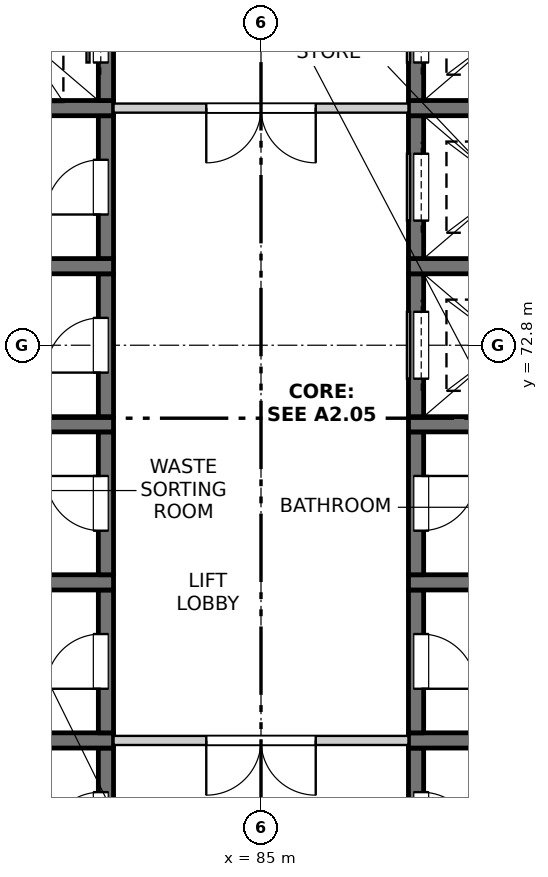
"""IFC4 building model, lengths in metres.
Left out: names, types, materials, properties, quantities, classifications, styles, units other than length and angle.
Written with IfcOpenShell. Run it as: python <this file> out.ifc"""

import sys

from ifc_helpers import new_model, si_unit, direction, frame, frame_2d, origin, place, context, subcontext, project, spatial, rectangle, extrude, element, fill, save


model = new_model("IFC4")
c1 = context("Model", 3, precision=1e-05, world=origin(), true_north=direction((0.0, 1.0)))
c2 = subcontext(c1, "Body", "Model", "MODEL_VIEW")
j1 = project(units=[si_unit("LENGTHUNIT", "METRE"), si_unit("PLANEANGLEUNIT", "RADIAN")], contexts=[c1])
p1 = place(None, origin())
s1 = spatial("IfcSite", under=j1, at=p1, CompositionType="ELEMENT")
p2 = place(p1, origin())
s2 = spatial("IfcBuilding", under=s1, at=p2, CompositionType="ELEMENT")
p3 = place(p2, frame((0.0, 0.0, 224.5)))
s3 = spatial("IfcBuildingStorey", under=s2, at=p3, CompositionType="ELEMENT", Elevation=224.5)
p4 = place(p3, frame((82.45, 63.825, -0.25), z_axis=(0.0, 0.0, 1.0), x_axis=(0.0, 1.0, 0.0)))
e1 = element("IfcWall", 1, at=p4, inside=s3, PredefinedType="SOLIDWALL", context=c2, shape_type="SweptSolid", body=[
    extrude(rectangle(XDim=2.35, YDim=0.25, at=frame_2d((1.175, 0.0))), origin(), (0.0, 0.0, 1.0), 3.4),
])
p5 = place(p4, frame((0.725, 0.0, 0.25)))
e2 = element("IfcOpeningElement", 2, at=p5, cuts=e1, PredefinedType="OPENING", context=c2, shape_type="SweptSolid", body=[
    extrude(rectangle(XDim=0.9, YDim=2.1, at=frame_2d((0.45, 1.05))), frame((0.0, 0.135, 0.0), z_axis=(0.0, -1.0, 0.0), x_axis=(1.0, 0.0, 0.0)), (0.0, 0.0, 1.0), 0.27),
])
p6 = place(p3, frame((79.575, 66.3, -0.25), z_axis=(0.0, 0.0, 1.0), x_axis=(1.0, 0.0, 0.0)))
e3 = element("IfcWall", 3, at=p6, inside=s3, PredefinedType="SOLIDWALL", context=c2, shape_type="SweptSolid", body=[
    extrude(rectangle(XDim=3.0, YDim=0.25, at=frame_2d((1.5, 0.0))), origin(), (0.0, 0.0, 1.0), 3.4),
])
p7 = place(p3, frame((82.45, 66.425, -0.25), z_axis=(0.0, 0.0, 1.0), x_axis=(0.0, 1.0, 0.0)))
e4 = element("IfcWall", 4, at=p7, inside=s3, PredefinedType="SOLIDWALL", context=c2, shape_type="SweptSolid", body=[
    extrude(rectangle(XDim=2.35, YDim=0.25, at=frame_2d((1.175, 0.0))), origin(), (0.0, 0.0, 1.0), 3.4),
])
p8 = place(p7, frame((0.725, 0.0, 0.25)))
e5 = element("IfcOpeningElement", 5, at=p8, cuts=e4, PredefinedType="OPENING", context=c2, shape_type="SweptSolid", body=[
    extrude(rectangle(XDim=0.9, YDim=2.1, at=frame_2d((0.45, 1.05))), frame((0.0, 0.135, 0.0), z_axis=(0.0, -1.0, 0.0), x_axis=(1.0, 0.0, 0.0)), (0.0, 0.0, 1.0), 0.27),
])
p9 = place(p3, frame((79.575, 68.9, -0.25), z_axis=(0.0, 0.0, 1.0), x_axis=(1.0, 0.0, 0.0)))
e6 = element("IfcWall", 6, at=p9, inside=s3, PredefinedType="SOLIDWALL", context=c2, shape_type="SweptSolid", body=[
    extrude(rectangle(XDim=3.0, YDim=0.25, at=frame_2d((1.5, 0.0))), origin(), (0.0, 0.0, 1.0), 3.4),
])
p10 = place(p3, frame((82.45, 69.025, -0.25), z_axis=(0.0, 0.0, 1.0), x_axis=(0.0, 1.0, 0.0)))
e7 = element("IfcWall", 7, at=p10, inside=s3, PredefinedType="SOLIDWALL", context=c2, shape_type="SweptSolid", body=[
    extrude(rectangle(XDim=2.35, YDim=0.25, at=frame_2d((1.175, 0.0))), origin(), (0.0, 0.0, 1.0), 3.4),
])
p11 = place(p10, frame((0.725, 0.0, 0.25)))
e8 = element("IfcOpeningElement", 8, at=p11, cuts=e7, PredefinedType="OPENING", context=c2, shape_type="SweptSolid", body=[
    extrude(rectangle(XDim=0.9, YDim=2.1, at=frame_2d((0.45, 1.05))), frame((0.0, 0.135, 0.0), z_axis=(0.0, -1.0, 0.0), x_axis=(1.0, 0.0, 0.0)), (0.0, 0.0, 1.0), 0.27),
])
p12 = place(p3, frame((79.575, 71.5, -0.25), z_axis=(0.0, 0.0, 1.0), x_axis=(1.0, 0.0, 0.0)))
e9 = element("IfcWall", 9, at=p12, inside=s3, PredefinedType="SOLIDWALL", context=c2, shape_type="SweptSolid", body=[
    extrude(rectangle(XDim=3.0, YDim=0.25, at=frame_2d((1.5, 0.0))), origin(), (0.0, 0.0, 1.0), 3.4),
])
p13 = place(p3, frame((82.45, 71.625, -0.25), z_axis=(0.0, 0.0, 1.0), x_axis=(0.0, 1.0, 0.0)))
e10 = element("IfcWall", 10, at=p13, inside=s3, PredefinedType="SOLIDWALL", context=c2, shape_type="SweptSolid", body=[
    extrude(rectangle(XDim=2.35, YDim=0.25, at=frame_2d((1.175, 0.0))), origin(), (0.0, 0.0, 1.0), 3.4),
])
p14 = place(p13, frame((0.725, 0.0, 0.25)))
e11 = element("IfcOpeningElement", 11, at=p14, cuts=e10, PredefinedType="OPENING", context=c2, shape_type="SweptSolid", body=[
    extrude(rectangle(XDim=0.9, YDim=2.1, at=frame_2d((0.45, 1.05))), frame((0.0, 0.135, 0.0), z_axis=(0.0, -1.0, 0.0), x_axis=(1.0, 0.0, 0.0)), (0.0, 0.0, 1.0), 0.27),
])
p15 = place(p3, frame((79.575, 74.1, -0.25), z_axis=(0.0, 0.0, 1.0), x_axis=(1.0, 0.0, 0.0)))
e12 = element("IfcWall", 12, at=p15, inside=s3, PredefinedType="SOLIDWALL", context=c2, shape_type="SweptSolid", body=[
    extrude(rectangle(XDim=3.0, YDim=0.25, at=frame_2d((1.5, 0.0))), origin(), (0.0, 0.0, 1.0), 3.4),
])
p16 = place(p3, frame((82.45, 74.225, -0.25), z_axis=(0.0, 0.0, 1.0), x_axis=(0.0, 1.0, 0.0)))
e13 = element("IfcWall", 13, at=p16, inside=s3, PredefinedType="SOLIDWALL", context=c2, shape_type="SweptSolid", body=[
    extrude(rectangle(XDim=2.35, YDim=0.25, at=frame_2d((1.175, 0.0))), origin(), (0.0, 0.0, 1.0), 3.4),
])
p17 = place(p16, frame((0.725, 0.0, 0.25)))
e14 = element("IfcOpeningElement", 14, at=p17, cuts=e13, PredefinedType="OPENING", context=c2, shape_type="SweptSolid", body=[
    extrude(rectangle(XDim=0.9, YDim=2.1, at=frame_2d((0.45, 1.05))), frame((0.0, 0.135, 0.0), z_axis=(0.0, -1.0, 0.0), x_axis=(1.0, 0.0, 0.0)), (0.0, 0.0, 1.0), 0.27),
])
p18 = place(p3, frame((79.575, 76.7, -0.25), z_axis=(0.0, 0.0, 1.0), x_axis=(1.0, 0.0, 0.0)))
e15 = element("IfcWall", 15, at=p18, inside=s3, PredefinedType="SOLIDWALL", context=c2, shape_type="SweptSolid", body=[
    extrude(rectangle(XDim=3.0, YDim=0.25, at=frame_2d((1.5, 0.0))), origin(), (0.0, 0.0, 1.0), 3.4),
])
p19 = place(p3, frame((82.45, 76.825, -0.25), z_axis=(0.0, 0.0, 1.0), x_axis=(0.0, 1.0, 0.0)))
e16 = element("IfcWall", 16, at=p19, inside=s3, PredefinedType="SOLIDWALL", context=c2, shape_type="SweptSolid", body=[
    extrude(rectangle(XDim=2.35, YDim=0.25, at=frame_2d((1.175, 0.0))), origin(), (0.0, 0.0, 1.0), 3.4),
])
p20 = place(p19, frame((0.625, 0.0, 0.25)))
e17 = element("IfcOpeningElement", 17, at=p20, cuts=e16, PredefinedType="OPENING", context=c2, shape_type="SweptSolid", body=[
    extrude(rectangle(XDim=1.1, YDim=2.1, at=frame_2d((0.55, 1.05))), frame((0.0, 0.135, 0.0), z_axis=(0.0, -1.0, 0.0), x_axis=(1.0, 0.0, 0.0)), (0.0, 0.0, 1.0), 0.27),
])
p21 = place(p3, frame((87.55, 63.825, -0.25), z_axis=(0.0, 0.0, 1.0), x_axis=(0.0, 1.0, 0.0)))
e18 = element("IfcWall", 18, at=p21, inside=s3, PredefinedType="SOLIDWALL", context=c2, shape_type="SweptSolid", body=[
    extrude(rectangle(XDim=2.35, YDim=0.25, at=frame_2d((1.175, 0.0))), origin(), (0.0, 0.0, 1.0), 3.4),
])
p22 = place(p21, frame((0.725, 0.0, 0.25)))
e19 = element("IfcOpeningElement", 19, at=p22, cuts=e18, PredefinedType="OPENING", context=c2, shape_type="SweptSolid", body=[
    extrude(rectangle(XDim=0.9, YDim=2.1, at=frame_2d((0.45, 1.05))), frame((0.0, 0.135, 0.0), z_axis=(0.0, -1.0, 0.0), x_axis=(1.0, 0.0, 0.0)), (0.0, 0.0, 1.0), 0.27),
])
p23 = place(p3, frame((87.425, 66.3, -0.25), z_axis=(0.0, 0.0, 1.0), x_axis=(1.0, 0.0, 0.0)))
e20 = element("IfcWall", 20, at=p23, inside=s3, PredefinedType="SOLIDWALL", context=c2, shape_type="SweptSolid", body=[
    extrude(rectangle(XDim=3.0, YDim=0.25, at=frame_2d((1.5, 0.0))), origin(), (0.0, 0.0, 1.0), 3.4),
])
p24 = place(p3, frame((87.55, 66.425, -0.25), z_axis=(0.0, 0.0, 1.0), x_axis=(0.0, 1.0, 0.0)))
e21 = element("IfcWall", 21, at=p24, inside=s3, PredefinedType="SOLIDWALL", context=c2, shape_type="SweptSolid", body=[
    extrude(rectangle(XDim=2.35, YDim=0.25, at=frame_2d((1.175, 0.0))), origin(), (0.0, 0.0, 1.0), 3.4),
])
p25 = place(p24, frame((0.725, 0.0, 0.25)))
e22 = element("IfcOpeningElement", 22, at=p25, cuts=e21, PredefinedType="OPENING", context=c2, shape_type="SweptSolid", body=[
    extrude(rectangle(XDim=0.9, YDim=2.1, at=frame_2d((0.45, 1.05))), frame((0.0, 0.135, 0.0), z_axis=(0.0, -1.0, 0.0), x_axis=(1.0, 0.0, 0.0)), (0.0, 0.0, 1.0), 0.27),
])
p26 = place(p3, frame((87.425, 68.9, -0.25), z_axis=(0.0, 0.0, 1.0), x_axis=(1.0, 0.0, 0.0)))
e23 = element("IfcWall", 23, at=p26, inside=s3, PredefinedType="SOLIDWALL", context=c2, shape_type="SweptSolid", body=[
    extrude(rectangle(XDim=3.0, YDim=0.25, at=frame_2d((1.5, 0.0))), origin(), (0.0, 0.0, 1.0), 3.4),
])
p27 = place(p3, frame((87.55, 69.025, -0.25), z_axis=(0.0, 0.0, 1.0), x_axis=(0.0, 1.0, 0.0)))
e24 = element("IfcWall", 24, at=p27, inside=s3, PredefinedType="SOLIDWALL", context=c2, shape_type="SweptSolid", body=[
    extrude(rectangle(XDim=2.35, YDim=0.25, at=frame_2d((1.175, 0.0))), origin(), (0.0, 0.0, 1.0), 3.4),
])
p28 = place(p27, frame((0.725, 0.0, 0.25)))
e25 = element("IfcOpeningElement", 25, at=p28, cuts=e24, PredefinedType="OPENING", context=c2, shape_type="SweptSolid", body=[
    extrude(rectangle(XDim=0.9, YDim=2.1, at=frame_2d((0.45, 1.05))), frame((0.0, 0.135, 0.0), z_axis=(0.0, -1.0, 0.0), x_axis=(1.0, 0.0, 0.0)), (0.0, 0.0, 1.0), 0.27),
])
p29 = place(p3, frame((87.425, 71.5, -0.25), z_axis=(0.0, 0.0, 1.0), x_axis=(1.0, 0.0, 0.0)))
e26 = element("IfcWall", 26, at=p29, inside=s3, PredefinedType="SOLIDWALL", context=c2, shape_type="SweptSolid", body=[
    extrude(rectangle(XDim=3.0, YDim=0.25, at=frame_2d((1.5, 0.0))), origin(), (0.0, 0.0, 1.0), 3.4),
])
p30 = place(p3, frame((87.55, 71.625, -0.25), z_axis=(0.0, 0.0, 1.0), x_axis=(0.0, 1.0, 0.0)))
e27 = element("IfcWall", 27, at=p30, inside=s3, PredefinedType="SOLIDWALL", context=c2, shape_type="SweptSolid", body=[
    extrude(rectangle(XDim=2.35, YDim=0.25, at=frame_2d((1.175, 0.0))), origin(), (0.0, 0.0, 1.0), 3.4),
])
p31 = place(p30, frame((0.625, 0.0, 0.25)))
e28 = element("IfcOpeningElement", 28, at=p31, cuts=e27, PredefinedType="OPENING", context=c2, shape_type="SweptSolid", body=[
    extrude(rectangle(XDim=1.1, YDim=2.1, at=frame_2d((0.55, 1.05))), frame((0.0, 0.135, 0.0), z_axis=(0.0, -1.0, 0.0), x_axis=(1.0, 0.0, 0.0)), (0.0, 0.0, 1.0), 0.27),
])
p32 = place(p3, frame((87.425, 74.1, -0.25), z_axis=(0.0, 0.0, 1.0), x_axis=(1.0, 0.0, 0.0)))
e29 = element("IfcWall", 29, at=p32, inside=s3, PredefinedType="SOLIDWALL", context=c2, shape_type="SweptSolid", body=[
    extrude(rectangle(XDim=3.0, YDim=0.25, at=frame_2d((1.5, 0.0))), origin(), (0.0, 0.0, 1.0), 3.4),
])
p33 = place(p3, frame((87.55, 74.225, -0.25), z_axis=(0.0, 0.0, 1.0), x_axis=(0.0, 1.0, 0.0)))
e30 = element("IfcWall", 30, at=p33, inside=s3, PredefinedType="SOLIDWALL", context=c2, shape_type="SweptSolid", body=[
    extrude(rectangle(XDim=2.35, YDim=0.25, at=frame_2d((1.175, 0.0))), origin(), (0.0, 0.0, 1.0), 3.4),
])
p34 = place(p33, frame((0.625, 0.0, 0.25)))
e31 = element("IfcOpeningElement", 31, at=p34, cuts=e30, PredefinedType="OPENING", context=c2, shape_type="SweptSolid", body=[
    extrude(rectangle(XDim=1.1, YDim=2.1, at=frame_2d((0.55, 1.05))), frame((0.0, 0.135, 0.0), z_axis=(0.0, -1.0, 0.0), x_axis=(1.0, 0.0, 0.0)), (0.0, 0.0, 1.0), 0.27),
])
p35 = place(p3, frame((87.425, 76.7, -0.25), z_axis=(0.0, 0.0, 1.0), x_axis=(1.0, 0.0, 0.0)))
e32 = element("IfcWall", 32, at=p35, inside=s3, PredefinedType="SOLIDWALL", context=c2, shape_type="SweptSolid", body=[
    extrude(rectangle(XDim=3.0, YDim=0.25, at=frame_2d((1.5, 0.0))), origin(), (0.0, 0.0, 1.0), 3.4),
])
p36 = place(p3, frame((87.55, 76.825, -0.25), z_axis=(0.0, 0.0, 1.0), x_axis=(0.0, 1.0, 0.0)))
e33 = element("IfcWall", 33, at=p36, inside=s3, PredefinedType="SOLIDWALL", context=c2, shape_type="SweptSolid", body=[
    extrude(rectangle(XDim=2.35, YDim=0.25, at=frame_2d((1.175, 0.0))), origin(), (0.0, 0.0, 1.0), 3.4),
])
p37 = place(p36, frame((0.625, 0.0, 0.25)))
e34 = element("IfcOpeningElement", 34, at=p37, cuts=e33, PredefinedType="OPENING", context=c2, shape_type="SweptSolid", body=[
    extrude(rectangle(XDim=1.1, YDim=2.1, at=frame_2d((0.55, 1.05))), frame((0.0, 0.135, 0.0), z_axis=(0.0, -1.0, 0.0), x_axis=(1.0, 0.0, 0.0)), (0.0, 0.0, 1.0), 0.27),
])
p38 = place(p3, frame((82.575, 66.3, 0.0), z_axis=(0.0, 0.0, 1.0), x_axis=(1.0, 0.0, 0.0)))
e35 = element("IfcWall", 35, at=p38, inside=s3, PredefinedType="PARTITIONING", context=c2, shape_type="SweptSolid", body=[
    extrude(rectangle(XDim=4.85, YDim=0.15, at=frame_2d((2.425, 0.0))), origin(), (0.0, 0.0, 1.0), 3.15),
])
p39 = place(p38, frame((1.525, 0.0, 0.0)))
e36 = element("IfcOpeningElement", 36, at=p39, cuts=e35, PredefinedType="OPENING", context=c2, shape_type="SweptSolid", body=[
    extrude(rectangle(XDim=1.8, YDim=2.1, at=frame_2d((0.9, 1.05))), frame((0.0, 0.085, 0.0), z_axis=(0.0, -1.0, 0.0), x_axis=(1.0, 0.0, 0.0)), (0.0, 0.0, 1.0), 0.17),
])
p40 = place(p3, frame((82.575, 76.7, 0.0), z_axis=(0.0, 0.0, 1.0), x_axis=(1.0, 0.0, 0.0)))
e37 = element("IfcWall", 37, at=p40, inside=s3, PredefinedType="PARTITIONING", context=c2, shape_type="SweptSolid", body=[
    extrude(rectangle(XDim=4.85, YDim=0.15, at=frame_2d((2.425, 0.0))), origin(), (0.0, 0.0, 1.0), 3.15),
])
p41 = place(p40, frame((1.525, 0.0, 0.0)))
e38 = element("IfcOpeningElement", 38, at=p41, cuts=e37, PredefinedType="OPENING", context=c2, shape_type="SweptSolid", body=[
    extrude(rectangle(XDim=1.8, YDim=2.1, at=frame_2d((0.9, 1.05))), frame((0.0, 0.085, 0.0), z_axis=(0.0, -1.0, 0.0), x_axis=(1.0, 0.0, 0.0)), (0.0, 0.0, 1.0), 0.17),
])
p42 = place(p5, origin())
e39 = element("IfcDoor", 39, at=p42, inside=s3, OperationType="SINGLE_SWING_LEFT", PredefinedType="DOOR", context=c2, shape_type="SweptSolid", body=[
    extrude(rectangle(XDim=0.9, YDim=2.1, at=frame_2d((0.45, 1.05))), frame((0.0, 0.11, 0.0), z_axis=(0.0, -1.0, 0.0), x_axis=(1.0, 0.0, 0.0)), (0.0, 0.0, 1.0), 0.05),
])
fill(e2, e39)
p43 = place(p22, origin())
e40 = element("IfcDoor", 40, at=p43, inside=s3, OperationType="SINGLE_SWING_RIGHT", PredefinedType="DOOR", context=c2, shape_type="SweptSolid", body=[
    extrude(rectangle(XDim=0.9, YDim=2.1, at=frame_2d((0.45, 1.05))), frame((0.0, -0.06, 0.0), z_axis=(0.0, -1.0, 0.0), x_axis=(1.0, 0.0, 0.0)), (0.0, 0.0, 1.0), 0.05),
])
fill(e19, e40)
p44 = place(p39, origin())
e41 = element("IfcDoor", 41, at=p44, inside=s3, OperationType="DOUBLE_DOOR_SINGLE_SWING", PredefinedType="DOOR", context=c2, shape_type="SweptSolid", body=[
    extrude(rectangle(XDim=1.8, YDim=2.1, at=frame_2d((0.9, 1.05))), frame((0.0, 0.025, 0.0), z_axis=(0.0, -1.0, 0.0), x_axis=(1.0, 0.0, 0.0)), (0.0, 0.0, 1.0), 0.05),
])
fill(e36, e41)
p45 = place(p8, origin())
e42 = element("IfcDoor", 42, at=p45, inside=s3, OperationType="SINGLE_SWING_LEFT", PredefinedType="DOOR", context=c2, shape_type="SweptSolid", body=[
    extrude(rectangle(XDim=0.9, YDim=2.1, at=frame_2d((0.45, 1.05))), frame((0.0, 0.11, 0.0), z_axis=(0.0, -1.0, 0.0), x_axis=(1.0, 0.0, 0.0)), (0.0, 0.0, 1.0), 0.05),
])
fill(e5, e42)
p46 = place(p25, origin())
e43 = element("IfcDoor", 43, at=p46, inside=s3, OperationType="SINGLE_SWING_RIGHT", PredefinedType="DOOR", context=c2, shape_type="SweptSolid", body=[
    extrude(rectangle(XDim=0.9, YDim=2.1, at=frame_2d((0.45, 1.05))), frame((0.0, -0.06, 0.0), z_axis=(0.0, -1.0, 0.0), x_axis=(1.0, 0.0, 0.0)), (0.0, 0.0, 1.0), 0.05),
])
fill(e22, e43)
p47 = place(p11, origin())
e44 = element("IfcDoor", 44, at=p47, inside=s3, OperationType="SINGLE_SWING_RIGHT", PredefinedType="DOOR", context=c2, shape_type="SweptSolid", body=[
    extrude(rectangle(XDim=0.9, YDim=2.1, at=frame_2d((0.45, 1.05))), frame((0.0, 0.11, 0.0), z_axis=(0.0, -1.0, 0.0), x_axis=(1.0, 0.0, 0.0)), (0.0, 0.0, 1.0), 0.05),
])
fill(e8, e44)
p48 = place(p28, origin())
e45 = element("IfcDoor", 45, at=p48, inside=s3, OperationType="SINGLE_SWING_LEFT", PredefinedType="DOOR", context=c2, shape_type="SweptSolid", body=[
    extrude(rectangle(XDim=0.9, YDim=2.1, at=frame_2d((0.45, 1.05))), frame((0.0, -0.06, 0.0), z_axis=(0.0, -1.0, 0.0), x_axis=(1.0, 0.0, 0.0)), (0.0, 0.0, 1.0), 0.05),
])
fill(e25, e45)
p49 = place(p14, origin())
e46 = element("IfcDoor", 46, at=p49, inside=s3, OperationType="SINGLE_SWING_LEFT", PredefinedType="DOOR", context=c2, shape_type="SweptSolid", body=[
    extrude(rectangle(XDim=0.9, YDim=2.1, at=frame_2d((0.45, 1.05))), frame((0.0, 0.11, 0.0), z_axis=(0.0, -1.0, 0.0), x_axis=(1.0, 0.0, 0.0)), (0.0, 0.0, 1.0), 0.05),
])
fill(e11, e46)
p50 = place(p31, origin())
e47 = element("IfcDoor", 47, at=p50, inside=s3, OperationType="SLIDING_TO_LEFT", PredefinedType="DOOR", context=c2, shape_type="SweptSolid", body=[
    extrude(rectangle(XDim=1.1, YDim=2.1, at=frame_2d((0.55, 1.05))), frame((0.0, -0.06, 0.0), z_axis=(0.0, -1.0, 0.0), x_axis=(1.0, 0.0, 0.0)), (0.0, 0.0, 1.0), 0.05),
])
fill(e28, e47)
p51 = place(p17, origin())
e48 = element("IfcDoor", 48, at=p51, inside=s3, OperationType="SINGLE_SWING_LEFT", PredefinedType="DOOR", context=c2, shape_type="SweptSolid", body=[
    extrude(rectangle(XDim=0.9, YDim=2.1, at=frame_2d((0.45, 1.05))), frame((0.0, 0.11, 0.0), z_axis=(0.0, -1.0, 0.0), x_axis=(1.0, 0.0, 0.0)), (0.0, 0.0, 1.0), 0.05),
])
fill(e14, e48)
p52 = place(p34, origin())
e49 = element("IfcDoor", 49, at=p52, inside=s3, OperationType="SLIDING_TO_LEFT", PredefinedType="DOOR", context=c2, shape_type="SweptSolid", body=[
    extrude(rectangle(XDim=1.1, YDim=2.1, at=frame_2d((0.55, 1.05))), frame((0.0, -0.06, 0.0), z_axis=(0.0, -1.0, 0.0), x_axis=(1.0, 0.0, 0.0)), (0.0, 0.0, 1.0), 0.05),
])
fill(e31, e49)
p53 = place(p41, origin())
e50 = element("IfcDoor", 50, at=p53, inside=s3, OperationType="DOUBLE_DOOR_SINGLE_SWING", PredefinedType="DOOR", context=c2, shape_type="SweptSolid", body=[
    extrude(rectangle(XDim=1.8, YDim=2.1, at=frame_2d((0.9, 1.05))), frame((0.0, 0.025, 0.0), z_axis=(0.0, -1.0, 0.0), x_axis=(1.0, 0.0, 0.0)), (0.0, 0.0, 1.0), 0.05),
])
fill(e38, e50)
p54 = place(p20, origin())
e51 = element("IfcDoor", 51, at=p54, inside=s3, OperationType="SLIDING_TO_LEFT", PredefinedType="DOOR", context=c2, shape_type="SweptSolid", body=[
    extrude(rectangle(XDim=1.1, YDim=2.1, at=frame_2d((0.55, 1.05))), frame((0.0, 0.11, 0.0), z_axis=(0.0, -1.0, 0.0), x_axis=(1.0, 0.0, 0.0)), (0.0, 0.0, 1.0), 0.05),
])
fill(e17, e51)
p55 = place(p37, origin())
e52 = element("IfcDoor", 52, at=p55, inside=s3, OperationType="SLIDING_TO_LEFT", PredefinedType="DOOR", context=c2, shape_type="SweptSolid", body=[
    extrude(rectangle(XDim=1.1, YDim=2.1, at=frame_2d((0.55, 1.05))), frame((0.0, -0.06, 0.0), z_axis=(0.0, -1.0, 0.0), x_axis=(1.0, 0.0, 0.0)), (0.0, 0.0, 1.0), 0.05),
])
fill(e34, e52)
save(model, sys.argv[1])
